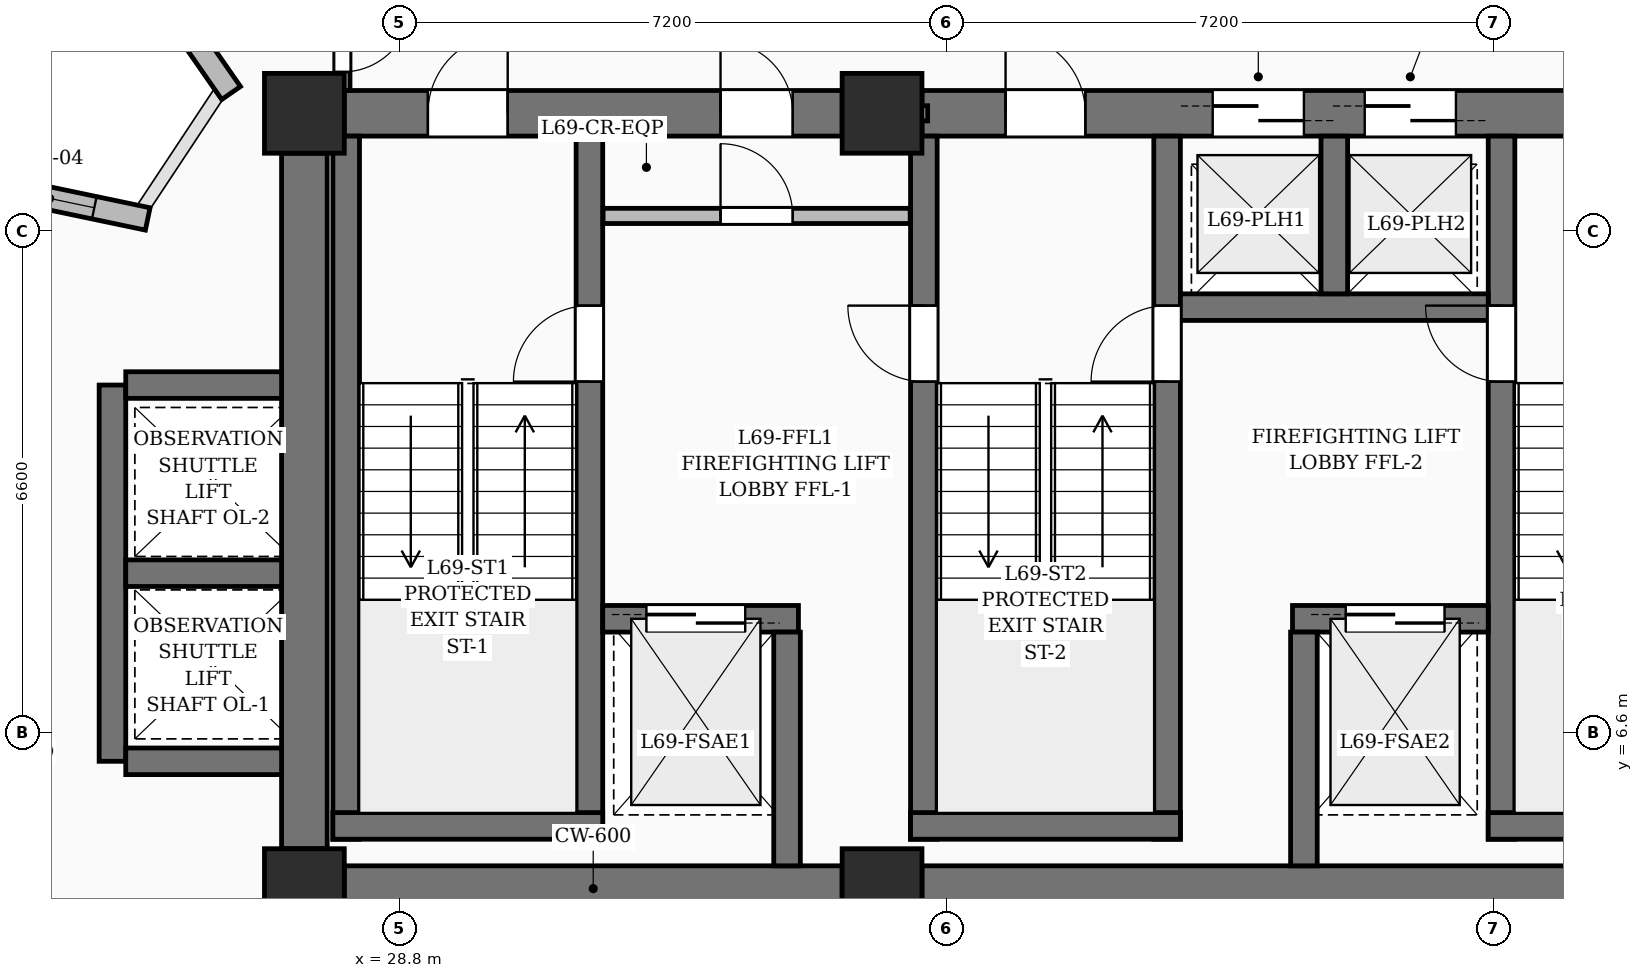
"""IFC4 building model, lengths in metres.
Left out: names, types, materials, properties, quantities, classifications, styles, units other than length and angle.
Written with IfcOpenShell. Run it as: python <this file> out.ifc"""

import sys

from ifc_helpers import new_model, si_unit, direction, frame, frame_2d, origin, origin_2d, place, context, subcontext, project, spatial, rectangle, extrude, element, fill, save


model = new_model("IFC4")
c1 = context("Model", 3, precision=1e-05, world=origin(), true_north=direction((0.0, 1.0)))
c2 = subcontext(c1, "Body", "Model", "MODEL_VIEW")
j1 = project(units=[si_unit("LENGTHUNIT", "METRE"), si_unit("PLANEANGLEUNIT", "RADIAN")], contexts=[c1])
p1 = place(None, origin())
s1 = spatial("IfcSite", under=j1, at=p1, CompositionType="ELEMENT")
p2 = place(p1, origin())
s2 = spatial("IfcBuilding", under=s1, at=p2, CompositionType="ELEMENT")
p3 = place(p2, frame((0.0, 0.0, 267.0)))
s3 = spatial("IfcBuildingStorey", under=s2, at=p3, CompositionType="ELEMENT", Elevation=267.0)
for number, where, z_axis, x_axis in (
    (1, (27.55, 4.55, 0.0), (0.0, 0.0, 1.0), (1.0, 0.0, 0.0)),
    (2, (35.15, 4.55, 0.0), (0.0, 0.0, 1.0), (1.0, 0.0, 0.0)),
    (3, (27.55, 14.75, 0.0), (0.0, 0.0, 1.0), (1.0, 0.0, 0.0)),
    (4, (35.15, 14.75, 0.0), (0.0, 0.0, 1.0), (1.0, 0.0, 0.0)),
):
    element("IfcColumn", number, at=place(p3, frame(where, z_axis=z_axis, x_axis=x_axis)), inside=s3, PredefinedType="COLUMN", context=c2, shape_type="SweptSolid", body=[
        extrude(rectangle(XDim=1.05, YDim=1.05, at=origin_2d()), origin(), (0.0, 0.0, 1.0), 3.75),
    ])
p4 = place(p3, frame((28.075, 4.55, 0.0), z_axis=(0.0, 0.0, 1.0), x_axis=(1.0, 0.0, 0.0)))
e5 = element("IfcWall", 5, at=p4, inside=s3, PredefinedType="SHEAR", context=c2, shape_type="SweptSolid", body=[
    extrude(rectangle(XDim=6.55, YDim=0.6, at=frame_2d((3.275, 0.0))), origin(), (0.0, 0.0, 1.0), 3.75),
])
p5 = place(p3, frame((35.675, 4.55, 0.0), z_axis=(0.0, 0.0, 1.0), x_axis=(1.0, 0.0, 0.0)))
e6 = element("IfcWall", 6, at=p5, inside=s3, PredefinedType="SHEAR", context=c2, shape_type="SweptSolid", body=[
    extrude(rectangle(XDim=10.85, YDim=0.6, at=frame_2d((5.425, 0.0))), origin(), (0.0, 0.0, 1.0), 3.75),
])
p6 = place(p3, frame((28.075, 14.75, 0.0), z_axis=(0.0, 0.0, 1.0), x_axis=(1.0, 0.0, 0.0)))
e7 = element("IfcWall", 7, at=p6, inside=s3, PredefinedType="SHEAR", context=c2, shape_type="SweptSolid", body=[
    extrude(rectangle(XDim=6.55, YDim=0.6, at=frame_2d((3.275, 0.0))), origin(), (0.0, 0.0, 1.0), 3.75),
])
p7 = place(p6, frame((1.1, 0.0, 0.0)))
e8 = element("IfcOpeningElement", 8, at=p7, cuts=e7, PredefinedType="OPENING", context=c2, shape_type="SweptSolid", body=[
    extrude(rectangle(XDim=1.05, YDim=2.15, at=frame_2d((0.525, 1.075))), frame((0.0, 0.31, 0.0), z_axis=(0.0, -1.0, 0.0), x_axis=(1.0, 0.0, 0.0)), (0.0, 0.0, 1.0), 0.62),
])
p8 = place(p6, frame((4.95, 0.0, 0.0)))
e9 = element("IfcOpeningElement", 9, at=p8, cuts=e7, PredefinedType="OPENING", context=c2, shape_type="SweptSolid", body=[
    extrude(rectangle(XDim=0.95, YDim=2.15, at=frame_2d((0.475, 1.075))), frame((0.0, 0.31, 0.0), z_axis=(0.0, -1.0, 0.0), x_axis=(1.0, 0.0, 0.0)), (0.0, 0.0, 1.0), 0.62),
])
p9 = place(p3, frame((35.675, 14.75, 0.0), z_axis=(0.0, 0.0, 1.0), x_axis=(1.0, 0.0, 0.0)))
e10 = element("IfcWall", 10, at=p9, inside=s3, PredefinedType="SHEAR", context=c2, shape_type="SweptSolid", body=[
    extrude(rectangle(XDim=10.85, YDim=0.6, at=frame_2d((5.425, 0.0))), origin(), (0.0, 0.0, 1.0), 3.75),
])
p10 = place(p9, frame((1.1, 0.0, 0.0)))
e11 = element("IfcOpeningElement", 11, at=p10, cuts=e10, PredefinedType="OPENING", context=c2, shape_type="SweptSolid", body=[
    extrude(rectangle(XDim=1.05, YDim=2.15, at=frame_2d((0.525, 1.075))), frame((0.0, 0.31, 0.0), z_axis=(0.0, -1.0, 0.0), x_axis=(1.0, 0.0, 0.0)), (0.0, 0.0, 1.0), 0.62),
])
p11 = place(p9, frame((8.7, 0.0, 0.0)))
e12 = element("IfcOpeningElement", 12, at=p11, cuts=e10, PredefinedType="OPENING", context=c2, shape_type="SweptSolid", body=[
    extrude(rectangle(XDim=1.05, YDim=2.15, at=frame_2d((0.525, 1.075))), frame((0.0, 0.31, 0.0), z_axis=(0.0, -1.0, 0.0), x_axis=(1.0, 0.0, 0.0)), (0.0, 0.0, 1.0), 0.62),
])
p12 = place(p9, frame((3.825, 0.0, 0.0)))
e13 = element("IfcOpeningElement", 13, at=p12, cuts=e10, PredefinedType="OPENING", context=c2, shape_type="SweptSolid", body=[
    extrude(rectangle(XDim=1.2, YDim=2.2, at=frame_2d((0.6, 1.1))), frame((0.0, 0.31, 0.0), z_axis=(0.0, -1.0, 0.0), x_axis=(1.0, 0.0, 0.0)), (0.0, 0.0, 1.0), 0.62),
])
p13 = place(p9, frame((5.825, 0.0, 0.0)))
e14 = element("IfcOpeningElement", 14, at=p13, cuts=e10, PredefinedType="OPENING", context=c2, shape_type="SweptSolid", body=[
    extrude(rectangle(XDim=1.2, YDim=2.2, at=frame_2d((0.6, 1.1))), frame((0.0, 0.31, 0.0), z_axis=(0.0, -1.0, 0.0), x_axis=(1.0, 0.0, 0.0)), (0.0, 0.0, 1.0), 0.62),
])
p14 = place(p3, frame((27.55, 5.075, 0.0), z_axis=(0.0, 0.0, 1.0), x_axis=(0.0, 1.0, 0.0)))
e15 = element("IfcWall", 15, at=p14, inside=s3, PredefinedType="SHEAR", context=c2, shape_type="SweptSolid", body=[
    extrude(rectangle(XDim=9.15, YDim=0.6, at=frame_2d((4.575, 0.0))), origin(), (0.0, 0.0, 1.0), 3.75),
])
p15 = place(p3, frame((28.1, 5.2, 0.0), z_axis=(0.0, 0.0, 1.0), x_axis=(0.0, 1.0, 0.0)))
e16 = element("IfcWall", 16, at=p15, inside=s3, PredefinedType="SOLIDWALL", context=c2, shape_type="SweptSolid", body=[
    extrude(rectangle(XDim=9.25, YDim=0.35, at=frame_2d((4.625, 0.0))), origin(), (0.0, 0.0, 1.0), 3.75),
])
p16 = place(p3, frame((31.3, 5.2, 0.0), z_axis=(0.0, 0.0, 1.0), x_axis=(0.0, 1.0, 0.0)))
e17 = element("IfcWall", 17, at=p16, inside=s3, PredefinedType="SOLIDWALL", context=c2, shape_type="SweptSolid", body=[
    extrude(rectangle(XDim=9.25, YDim=0.35, at=frame_2d((4.625, 0.0))), origin(), (0.0, 0.0, 1.0), 3.75),
])
p17 = place(p16, frame((6.02, 0.0, 0.0)))
e18 = element("IfcOpeningElement", 18, at=p17, cuts=e17, PredefinedType="OPENING", context=c2, shape_type="SweptSolid", body=[
    extrude(rectangle(XDim=1.0, YDim=2.15, at=frame_2d((0.5, 1.075))), frame((0.0, 0.185, 0.0), z_axis=(0.0, -1.0, 0.0), x_axis=(1.0, 0.0, 0.0)), (0.0, 0.0, 1.0), 0.37),
])
p18 = place(p3, frame((27.925, 5.375, 0.0), z_axis=(0.0, 0.0, 1.0), x_axis=(1.0, 0.0, 0.0)))
e19 = element("IfcWall", 19, at=p18, inside=s3, PredefinedType="SOLIDWALL", context=c2, shape_type="SweptSolid", body=[
    extrude(rectangle(XDim=3.55, YDim=0.35, at=frame_2d((1.775, 0.0))), origin(), (0.0, 0.0, 1.0), 3.75),
])
p19 = place(p3, frame((35.7, 5.2, 0.0), z_axis=(0.0, 0.0, 1.0), x_axis=(0.0, 1.0, 0.0)))
e20 = element("IfcWall", 20, at=p19, inside=s3, PredefinedType="SOLIDWALL", context=c2, shape_type="SweptSolid", body=[
    extrude(rectangle(XDim=9.25, YDim=0.35, at=frame_2d((4.625, 0.0))), origin(), (0.0, 0.0, 1.0), 3.75),
])
p20 = place(p19, frame((6.02, 0.0, 0.0)))
e21 = element("IfcOpeningElement", 21, at=p20, cuts=e20, PredefinedType="OPENING", context=c2, shape_type="SweptSolid", body=[
    extrude(rectangle(XDim=1.0, YDim=2.15, at=frame_2d((0.5, 1.075))), frame((0.0, 0.185, 0.0), z_axis=(0.0, -1.0, 0.0), x_axis=(1.0, 0.0, 0.0)), (0.0, 0.0, 1.0), 0.37),
])
p21 = place(p3, frame((38.9, 5.2, 0.0), z_axis=(0.0, 0.0, 1.0), x_axis=(0.0, 1.0, 0.0)))
e22 = element("IfcWall", 22, at=p21, inside=s3, PredefinedType="SOLIDWALL", context=c2, shape_type="SweptSolid", body=[
    extrude(rectangle(XDim=9.25, YDim=0.35, at=frame_2d((4.625, 0.0))), origin(), (0.0, 0.0, 1.0), 3.75),
])
p22 = place(p21, frame((6.02, 0.0, 0.0)))
e23 = element("IfcOpeningElement", 23, at=p22, cuts=e22, PredefinedType="OPENING", context=c2, shape_type="SweptSolid", body=[
    extrude(rectangle(XDim=1.0, YDim=2.15, at=frame_2d((0.5, 1.075))), frame((0.0, 0.185, 0.0), z_axis=(0.0, -1.0, 0.0), x_axis=(1.0, 0.0, 0.0)), (0.0, 0.0, 1.0), 0.37),
])
p23 = place(p3, frame((35.525, 5.375, 0.0), z_axis=(0.0, 0.0, 1.0), x_axis=(1.0, 0.0, 0.0)))
e24 = element("IfcWall", 24, at=p23, inside=s3, PredefinedType="SOLIDWALL", context=c2, shape_type="SweptSolid", body=[
    extrude(rectangle(XDim=3.55, YDim=0.35, at=frame_2d((1.775, 0.0))), origin(), (0.0, 0.0, 1.0), 3.75),
])
p24 = place(p3, frame((43.3, 5.2, 0.0), z_axis=(0.0, 0.0, 1.0), x_axis=(0.0, 1.0, 0.0)))
e25 = element("IfcWall", 25, at=p24, inside=s3, PredefinedType="SOLIDWALL", context=c2, shape_type="SweptSolid", body=[
    extrude(rectangle(XDim=9.25, YDim=0.35, at=frame_2d((4.625, 0.0))), origin(), (0.0, 0.0, 1.0), 3.75),
])
p25 = place(p24, frame((6.02, 0.0, 0.0)))
e26 = element("IfcOpeningElement", 26, at=p25, cuts=e25, PredefinedType="OPENING", context=c2, shape_type="SweptSolid", body=[
    extrude(rectangle(XDim=1.0, YDim=2.15, at=frame_2d((0.5, 1.075))), frame((0.0, 0.185, 0.0), z_axis=(0.0, -1.0, 0.0), x_axis=(1.0, 0.0, 0.0)), (0.0, 0.0, 1.0), 0.37),
])
p26 = place(p3, frame((43.125, 5.375, 0.0), z_axis=(0.0, 0.0, 1.0), x_axis=(1.0, 0.0, 0.0)))
e27 = element("IfcWall", 27, at=p26, inside=s3, PredefinedType="SOLIDWALL", context=c2, shape_type="SweptSolid", body=[
    extrude(rectangle(XDim=3.55, YDim=0.35, at=frame_2d((1.775, 0.0))), origin(), (0.0, 0.0, 1.0), 3.75),
])
p27 = place(p3, frame((31.475, 8.1, 0.0), z_axis=(0.0, 0.0, 1.0), x_axis=(1.0, 0.0, 0.0)))
e28 = element("IfcWall", 28, at=p27, inside=s3, PredefinedType="SOLIDWALL", context=c2, shape_type="SweptSolid", body=[
    extrude(rectangle(XDim=2.575, YDim=0.35, at=frame_2d((1.288, 0.0))), origin(), (0.0, 0.0, 1.0), 3.75),
])
p28 = place(p27, frame((0.575, 0.0, 0.0)))
e29 = element("IfcOpeningElement", 29, at=p28, cuts=e28, PredefinedType="OPENING", context=c2, shape_type="SweptSolid", body=[
    extrude(rectangle(XDim=1.3, YDim=2.25, at=frame_2d((0.65, 1.125))), frame((0.0, 0.185, 0.0), z_axis=(0.0, -1.0, 0.0), x_axis=(1.0, 0.0, 0.0)), (0.0, 0.0, 1.0), 0.37),
])
p29 = place(p3, frame((40.55, 8.1, 0.0), z_axis=(0.0, 0.0, 1.0), x_axis=(1.0, 0.0, 0.0)))
e30 = element("IfcWall", 30, at=p29, inside=s3, PredefinedType="SOLIDWALL", context=c2, shape_type="SweptSolid", body=[
    extrude(rectangle(XDim=2.575, YDim=0.35, at=frame_2d((1.288, 0.0))), origin(), (0.0, 0.0, 1.0), 3.75),
])
p30 = place(p29, frame((0.7, 0.0, 0.0)))
e31 = element("IfcOpeningElement", 31, at=p30, cuts=e30, PredefinedType="OPENING", context=c2, shape_type="SweptSolid", body=[
    extrude(rectangle(XDim=1.3, YDim=2.25, at=frame_2d((0.65, 1.125))), frame((0.0, 0.185, 0.0), z_axis=(0.0, -1.0, 0.0), x_axis=(1.0, 0.0, 0.0)), (0.0, 0.0, 1.0), 0.37),
])
for number, where, z_axis, x_axis in (
    (32, (33.9, 4.85, 0.0), (0.0, 0.0, 1.0), (0.0, 1.0, 0.0)),
    (33, (40.7, 4.85, 0.0), (0.0, 0.0, 1.0), (0.0, 1.0, 0.0)),
):
    element("IfcWall", number, at=place(p3, frame(where, z_axis=z_axis, x_axis=x_axis)), inside=s3, PredefinedType="SOLIDWALL", context=c2, shape_type="SweptSolid", body=[
        extrude(rectangle(XDim=3.075, YDim=0.35, at=frame_2d((1.538, 0.0))), origin(), (0.0, 0.0, 1.0), 3.75),
    ])
p31 = place(p3, frame((39.075, 12.2, 0.0), z_axis=(0.0, 0.0, 1.0), x_axis=(1.0, 0.0, 0.0)))
e34 = element("IfcWall", 34, at=p31, inside=s3, PredefinedType="SOLIDWALL", context=c2, shape_type="SweptSolid", body=[
    extrude(rectangle(XDim=4.05, YDim=0.35, at=frame_2d((2.025, 0.0))), origin(), (0.0, 0.0, 1.0), 3.75),
])
p32 = place(p3, frame((41.1, 12.375, 0.0), z_axis=(0.0, 0.0, 1.0), x_axis=(0.0, 1.0, 0.0)))
e35 = element("IfcWall", 35, at=p32, inside=s3, PredefinedType="SOLIDWALL", context=c2, shape_type="SweptSolid", body=[
    extrude(rectangle(XDim=2.075, YDim=0.35, at=frame_2d((1.038, 0.0))), origin(), (0.0, 0.0, 1.0), 3.75),
])
p33 = place(p3, frame((25.025, 6.225, 0.0), z_axis=(0.0, 0.0, 1.0), x_axis=(0.0, 1.0, 0.0)))
e36 = element("IfcWall", 36, at=p33, inside=s3, PredefinedType="SOLIDWALL", context=c2, shape_type="SweptSolid", body=[
    extrude(rectangle(XDim=4.95, YDim=0.35, at=frame_2d((2.475, 0.0))), origin(), (0.0, 0.0, 1.0), 3.75),
])
for number, where, z_axis, x_axis in (
    (37, (25.2, 6.225, 0.0), (0.0, 0.0, 1.0), (1.0, 0.0, 0.0)),
    (38, (25.2, 8.7, 0.0), (0.0, 0.0, 1.0), (1.0, 0.0, 0.0)),
    (39, (25.2, 11.175, 0.0), (0.0, 0.0, 1.0), (1.0, 0.0, 0.0)),
):
    element("IfcWall", number, at=place(p3, frame(where, z_axis=z_axis, x_axis=x_axis)), inside=s3, PredefinedType="SOLIDWALL", context=c2, shape_type="SweptSolid", body=[
        extrude(rectangle(XDim=2.05, YDim=0.35, at=frame_2d((1.025, 0.0))), origin(), (0.0, 0.0, 1.0), 3.75),
    ])
p34 = place(p3, frame((22.951, 13.892, 0.0), z_axis=(0.0, 0.0, 1.0), x_axis=(0.978788869041, -0.204871544732, 0.0)))
e40 = element("IfcWall", 40, at=p34, inside=s3, PredefinedType="SOLIDWALL", context=c2, shape_type="SweptSolid", body=[
    extrude(rectangle(XDim=2.593, YDim=0.3, at=frame_2d((1.296, 0.0))), origin(), (0.0, 0.0, 1.0), 2.825),
])
p35 = place(p34, frame((0.675, 0.0, 0.8)))
e41 = element("IfcOpeningElement", 41, at=p35, cuts=e40, PredefinedType="OPENING", context=c2, shape_type="SweptSolid", body=[
    extrude(rectangle(XDim=1.2, YDim=1.8, at=frame_2d((0.6, 0.9))), frame((0.0, 0.16, 0.0), z_axis=(0.0, -1.0, 0.0), x_axis=(1.0, 0.0, 0.0)), (0.0, 0.0, 1.0), 0.32),
])
p36 = place(p3, frame((26.586, 15.017, 0.0), z_axis=(0.0, 0.0, 1.0), x_axis=(-0.570741639744, 0.821129697833, 0.0)))
e42 = element("IfcWall", 42, at=p36, inside=s3, PredefinedType="SOLIDWALL", context=c2, shape_type="SweptSolid", body=[
    extrude(rectangle(XDim=2.593, YDim=0.3, at=frame_2d((1.296, 0.0))), origin(), (0.0, 0.0, 1.0), 2.825),
])
p37 = place(p3, frame((34.72, 14.75, 0.0), z_axis=(0.0, 0.0, 1.0), x_axis=(1.0, 0.0, 0.0)))
e43 = element("IfcWall", 43, at=p37, inside=s3, PredefinedType="PARTITIONING", context=c2, shape_type="SweptSolid", body=[
    extrude(rectangle(XDim=1.03, YDim=0.2, at=frame_2d((0.515, 0.0))), origin(), (0.0, 0.0, 1.0), 2.685),
])
p38 = place(p3, frame((31.48, 13.4, 0.0), z_axis=(0.0, 0.0, 1.0), x_axis=(1.0, 0.0, 0.0)))
e44 = element("IfcWall", 44, at=p38, inside=s3, PredefinedType="PARTITIONING", context=c2, shape_type="SweptSolid", body=[
    extrude(rectangle(XDim=4.04, YDim=0.2, at=frame_2d((2.02, 0.0))), origin(), (0.0, 0.0, 1.0), 3.5),
])
p39 = place(p38, frame((1.545, 0.0, 0.0)))
e45 = element("IfcOpeningElement", 45, at=p39, cuts=e44, PredefinedType="OPENING", context=c2, shape_type="SweptSolid", body=[
    extrude(rectangle(XDim=0.95, YDim=2.15, at=frame_2d((0.475, 1.075))), frame((0.0, 0.11, 0.0), z_axis=(0.0, -1.0, 0.0), x_axis=(1.0, 0.0, 0.0)), (0.0, 0.0, 1.0), 0.22),
])
p40 = place(p3, frame((28.05, 16.75, 0.0), z_axis=(0.0, 0.0, 1.0), x_axis=(0.0, -1.0, 0.0)))
e46 = element("IfcWall", 46, at=p40, inside=s3, PredefinedType="PARTITIONING", context=c2, shape_type="SweptSolid", body=[
    extrude(rectangle(XDim=1.7, YDim=0.2, at=frame_2d((0.85, 0.0))), origin(), (0.0, 0.0, 1.0), 3.5),
])
p41 = place(p40, frame((0.556, 0.0, 0.0)))
e47 = element("IfcOpeningElement", 47, at=p41, cuts=e46, PredefinedType="OPENING", context=c2, shape_type="SweptSolid", body=[
    extrude(rectangle(XDim=0.9, YDim=2.1, at=frame_2d((0.45, 1.05))), frame((0.0, 0.11, 0.0), z_axis=(0.0, -1.0, 0.0), x_axis=(1.0, 0.0, 0.0)), (0.0, 0.0, 1.0), 0.22),
])
p42 = place(p35, origin())
e48 = element("IfcWindow", 48, at=p42, inside=s3, PartitioningType="SINGLE_PANEL", PredefinedType="WINDOW", context=c2, shape_type="SweptSolid", body=[
    extrude(rectangle(XDim=1.2, YDim=1.8, at=frame_2d((0.6, 0.9))), frame((0.0, 0.03, 0.0), z_axis=(0.0, -1.0, 0.0), x_axis=(1.0, 0.0, 0.0)), (0.0, 0.0, 1.0), 0.06),
])
fill(e41, e48)
p43 = place(p7, origin())
e49 = element("IfcDoor", 49, at=p43, inside=s3, OperationType="SINGLE_SWING_RIGHT", PredefinedType="DOOR", context=c2, shape_type="SweptSolid", body=[
    extrude(rectangle(XDim=1.05, YDim=2.15, at=frame_2d((0.525, 1.075))), frame((0.0, 0.025, 0.0), z_axis=(0.0, -1.0, 0.0), x_axis=(1.0, 0.0, 0.0)), (0.0, 0.0, 1.0), 0.05),
])
fill(e8, e49)
p44 = place(p10, origin())
e50 = element("IfcDoor", 50, at=p44, inside=s3, OperationType="SINGLE_SWING_LEFT", PredefinedType="DOOR", context=c2, shape_type="SweptSolid", body=[
    extrude(rectangle(XDim=1.05, YDim=2.15, at=frame_2d((0.525, 1.075))), frame((0.0, 0.025, 0.0), z_axis=(0.0, -1.0, 0.0), x_axis=(1.0, 0.0, 0.0)), (0.0, 0.0, 1.0), 0.05),
])
fill(e11, e50)
p45 = place(p17, origin())
e51 = element("IfcDoor", 51, at=p45, inside=s3, OperationType="SINGLE_SWING_LEFT", PredefinedType="DOOR", context=c2, shape_type="SweptSolid", body=[
    extrude(rectangle(XDim=1.0, YDim=2.15, at=frame_2d((0.5, 1.075))), frame((0.0, 0.025, 0.0), z_axis=(0.0, -1.0, 0.0), x_axis=(1.0, 0.0, 0.0)), (0.0, 0.0, 1.0), 0.05),
])
fill(e18, e51)
p46 = place(p20, origin())
e52 = element("IfcDoor", 52, at=p46, inside=s3, OperationType="SINGLE_SWING_RIGHT", PredefinedType="DOOR", context=c2, shape_type="SweptSolid", body=[
    extrude(rectangle(XDim=1.0, YDim=2.15, at=frame_2d((0.5, 1.075))), frame((0.0, 0.025, 0.0), z_axis=(0.0, -1.0, 0.0), x_axis=(1.0, 0.0, 0.0)), (0.0, 0.0, 1.0), 0.05),
])
fill(e21, e52)
p47 = place(p22, origin())
e53 = element("IfcDoor", 53, at=p47, inside=s3, OperationType="SINGLE_SWING_LEFT", PredefinedType="DOOR", context=c2, shape_type="SweptSolid", body=[
    extrude(rectangle(XDim=1.0, YDim=2.15, at=frame_2d((0.5, 1.075))), frame((0.0, 0.025, 0.0), z_axis=(0.0, -1.0, 0.0), x_axis=(1.0, 0.0, 0.0)), (0.0, 0.0, 1.0), 0.05),
])
fill(e23, e53)
p48 = place(p25, origin())
e54 = element("IfcDoor", 54, at=p48, inside=s3, OperationType="SINGLE_SWING_RIGHT", PredefinedType="DOOR", context=c2, shape_type="SweptSolid", body=[
    extrude(rectangle(XDim=1.0, YDim=2.15, at=frame_2d((0.5, 1.075))), frame((0.0, 0.025, 0.0), z_axis=(0.0, -1.0, 0.0), x_axis=(1.0, 0.0, 0.0)), (0.0, 0.0, 1.0), 0.05),
])
fill(e26, e54)
p49 = place(p28, origin())
e55 = element("IfcDoor", 55, at=p49, inside=s3, OperationType="DOUBLE_DOOR_SLIDING", PredefinedType="DOOR", context=c2, shape_type="SweptSolid", body=[
    extrude(rectangle(XDim=1.3, YDim=2.25, at=frame_2d((0.65, 1.125))), frame((0.0, 0.025, 0.0), z_axis=(0.0, -1.0, 0.0), x_axis=(1.0, 0.0, 0.0)), (0.0, 0.0, 1.0), 0.05),
])
fill(e29, e55)
p50 = place(p30, origin())
e56 = element("IfcDoor", 56, at=p50, inside=s3, OperationType="DOUBLE_DOOR_SLIDING", PredefinedType="DOOR", context=c2, shape_type="SweptSolid", body=[
    extrude(rectangle(XDim=1.3, YDim=2.25, at=frame_2d((0.65, 1.125))), frame((0.0, 0.025, 0.0), z_axis=(0.0, -1.0, 0.0), x_axis=(1.0, 0.0, 0.0)), (0.0, 0.0, 1.0), 0.05),
])
fill(e31, e56)
p51 = place(p12, origin())
e57 = element("IfcDoor", 57, at=p51, inside=s3, OperationType="DOUBLE_DOOR_SLIDING", PredefinedType="DOOR", context=c2, shape_type="SweptSolid", body=[
    extrude(rectangle(XDim=1.2, YDim=2.2, at=frame_2d((0.6, 1.1))), frame((0.0, 0.025, 0.0), z_axis=(0.0, -1.0, 0.0), x_axis=(1.0, 0.0, 0.0)), (0.0, 0.0, 1.0), 0.05),
])
fill(e13, e57)
p52 = place(p13, origin())
e58 = element("IfcDoor", 58, at=p52, inside=s3, OperationType="DOUBLE_DOOR_SLIDING", PredefinedType="DOOR", context=c2, shape_type="SweptSolid", body=[
    extrude(rectangle(XDim=1.2, YDim=2.2, at=frame_2d((0.6, 1.1))), frame((0.0, 0.025, 0.0), z_axis=(0.0, -1.0, 0.0), x_axis=(1.0, 0.0, 0.0)), (0.0, 0.0, 1.0), 0.05),
])
fill(e14, e58)
p53 = place(p39, origin())
e59 = element("IfcDoor", 59, at=p53, inside=s3, OperationType="SINGLE_SWING_LEFT", PredefinedType="DOOR", context=c2, shape_type="SweptSolid", body=[
    extrude(rectangle(XDim=0.95, YDim=2.15, at=frame_2d((0.475, 1.075))), frame((0.0, 0.025, 0.0), z_axis=(0.0, -1.0, 0.0), x_axis=(1.0, 0.0, 0.0)), (0.0, 0.0, 1.0), 0.05),
])
fill(e45, e59)
p54 = place(p8, origin())
e60 = element("IfcDoor", 60, at=p54, inside=s3, OperationType="SINGLE_SWING_LEFT", PredefinedType="DOOR", context=c2, shape_type="SweptSolid", body=[
    extrude(rectangle(XDim=0.95, YDim=2.15, at=frame_2d((0.475, 1.075))), frame((0.0, 0.025, 0.0), z_axis=(0.0, -1.0, 0.0), x_axis=(1.0, 0.0, 0.0)), (0.0, 0.0, 1.0), 0.05),
])
fill(e9, e60)
p55 = place(p41, origin())
e61 = element("IfcDoor", 61, at=p55, inside=s3, OperationType="SINGLE_SWING_LEFT", PredefinedType="DOOR", context=c2, shape_type="SweptSolid", body=[
    extrude(rectangle(XDim=0.9, YDim=2.1, at=frame_2d((0.45, 1.05))), frame((0.0, 0.025, 0.0), z_axis=(0.0, -1.0, 0.0), x_axis=(1.0, 0.0, 0.0)), (0.0, 0.0, 1.0), 0.05),
])
fill(e47, e61)
save(model, sys.argv[1])
